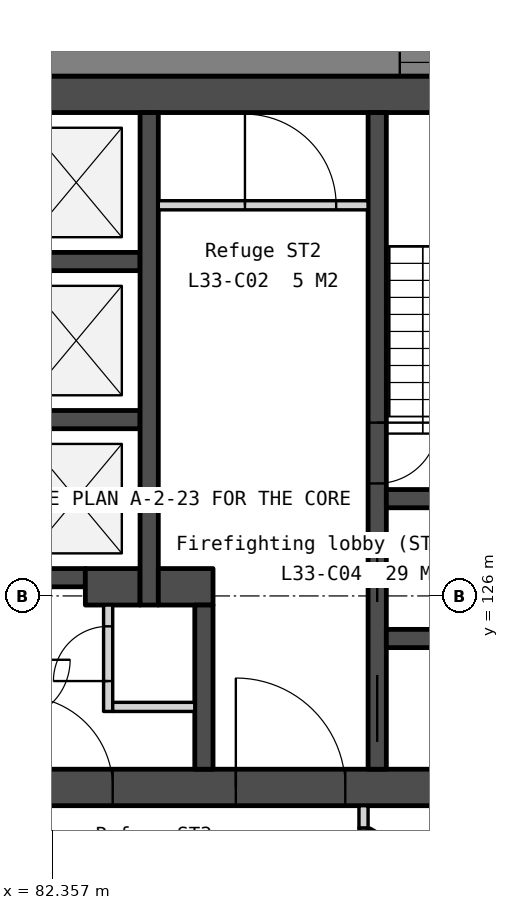
"""IFC4 building model, lengths in metres.
Left out: names, types, materials, properties, quantities, classifications, styles, units other than length and angle.
Written with IfcOpenShell. Run it as: python <this file> out.ifc"""

import sys

from ifc_helpers import new_model, si_unit, direction, frame, frame_2d, origin, place, context, subcontext, project, spatial, polyline, rectangle, outline, extrude, element, fill, save


model = new_model("IFC4")
c1 = context("Model", 3, precision=1e-05, world=origin(), true_north=direction((0.0, 1.0)))
c2 = subcontext(c1, "Body", "Model", "MODEL_VIEW")
j1 = project(units=[si_unit("LENGTHUNIT", "METRE"), si_unit("PLANEANGLEUNIT", "RADIAN")], contexts=[c1])
p1 = place(None, origin())
s1 = spatial("IfcSite", under=j1, at=p1, CompositionType="ELEMENT")
p2 = place(p1, origin())
s2 = spatial("IfcBuilding", under=s1, at=p2, CompositionType="ELEMENT")
p3 = place(p2, frame((0.0, 0.0, 132.5)))
s3 = spatial("IfcBuildingStorey", under=s2, at=p3, CompositionType="ELEMENT", Elevation=132.5)
p4 = place(p3, frame((69.0, 134.25, 0.0), z_axis=(0.0, 0.0, 1.0), x_axis=(1.0, 0.0, 0.0)))
e1 = element("IfcWall", 1, at=p4, inside=s3, PredefinedType="SOLIDWALL", context=c2, shape_type="SweptSolid", body=[
    extrude(rectangle(XDim=22.0, YDim=0.6, at=frame_2d((11.0, 0.0))), origin(), (0.0, 0.0, 1.0), 3.75),
])
p5 = place(p3, frame((69.0, 122.85, 0.0), z_axis=(0.0, 0.0, 1.0), x_axis=(1.0, 0.0, 0.0)))
e2 = element("IfcWall", 2, at=p5, inside=s3, PredefinedType="SOLIDWALL", context=c2, shape_type="SweptSolid", body=[
    extrude(rectangle(XDim=22.0, YDim=0.6, at=frame_2d((11.0, 0.0))), origin(), (0.0, 0.0, 1.0), 3.75),
])
p6 = place(p5, frame((16.375, 0.0, 0.0)))
e3 = element("IfcOpeningElement", 3, at=p6, cuts=e2, PredefinedType="OPENING", context=c2, shape_type="SweptSolid", body=[
    extrude(rectangle(XDim=1.8, YDim=2.1, at=frame_2d((0.9, 1.05))), frame((0.0, 0.31, 0.0), z_axis=(0.0, -1.0, 0.0), x_axis=(1.0, 0.0, 0.0)), (0.0, 0.0, 1.0), 0.62),
])
p7 = place(p5, frame((3.825, 0.0, 0.0)))
e4 = element("IfcOpeningElement", 4, at=p7, cuts=e2, PredefinedType="OPENING", context=c2, shape_type="SweptSolid", body=[
    extrude(rectangle(XDim=1.8, YDim=2.1, at=frame_2d((0.9, 1.05))), frame((0.0, 0.31, 0.0), z_axis=(0.0, -1.0, 0.0), x_axis=(1.0, 0.0, 0.0)), (0.0, 0.0, 1.0), 0.62),
])
p8 = place(p5, frame((12.85, 0.0, 0.0)))
e5 = element("IfcOpeningElement", 5, at=p8, cuts=e2, PredefinedType="OPENING", context=c2, shape_type="SweptSolid", body=[
    extrude(rectangle(XDim=1.5, YDim=2.1, at=frame_2d((0.75, 1.05))), frame((0.0, 0.31, 0.0), z_axis=(0.0, -1.0, 0.0), x_axis=(1.0, 0.0, 0.0)), (0.0, 0.0, 1.0), 0.62),
])
for number, where, z_axis, x_axis in (
    (6, (81.7, 131.5, 0.0), (0.0, 0.0, 1.0), (1.0, 0.0, 0.0)),
    (7, (81.7, 128.9, 0.0), (0.0, 0.0, 1.0), (1.0, 0.0, 0.0)),
):
    element("IfcWall", number, at=place(p3, frame(where, z_axis=z_axis, x_axis=x_axis)), inside=s3, PredefinedType="SOLIDWALL", context=c2, shape_type="SweptSolid", body=[
        extrude(rectangle(XDim=2.1, YDim=0.3, at=frame_2d((1.05, 0.0))), origin(), (0.0, 0.0, 1.0), 3.75),
    ])
p9 = place(p3, frame((81.7, 126.3, 0.0), z_axis=(0.0, 0.0, 1.0), x_axis=(1.0, 0.0, 0.0)))
e8 = element("IfcWall", 8, at=p9, inside=s3, PredefinedType="SOLIDWALL", context=c2, shape_type="SweptSolid", body=[
    extrude(rectangle(XDim=1.2, YDim=0.3, at=frame_2d((0.6, 0.0))), origin(), (0.0, 0.0, 1.0), 3.75),
])
p10 = place(p3, frame((82.9, 126.15, 0.0), z_axis=(0.0, 0.0, 1.0), x_axis=(1.0, 0.0, 0.0)))
e9 = element("IfcWall", 9, at=p10, inside=s3, PredefinedType="SOLIDWALL", context=c2, shape_type="SweptSolid", body=[
    extrude(rectangle(XDim=0.9, YDim=0.6, at=frame_2d((0.45, 0.0))), origin(), (0.0, 0.0, 1.0), 3.75),
])
p11 = place(p3, frame((83.275, 125.85, 0.0), z_axis=(0.0, 0.0, 1.0), x_axis=(0.0, -1.0, 0.0)))
e10 = element("IfcWall", 10, at=p11, inside=s3, PredefinedType="PARTITIONING", context=c2, shape_type="SweptSolid", body=[
    extrude(rectangle(XDim=1.75, YDim=0.15, at=frame_2d((0.875, 0.0))), origin(), (0.0, 0.0, 1.0), 3.75),
])
p12 = place(p11, frame((0.35, 0.0, 0.0)))
e11 = element("IfcOpeningElement", 11, at=p12, cuts=e10, PredefinedType="OPENING", context=c2, shape_type="SweptSolid", body=[
    extrude(rectangle(XDim=0.9, YDim=2.1, at=frame_2d((0.45, 1.05))), frame((0.0, 0.085, 0.0), z_axis=(0.0, -1.0, 0.0), x_axis=(1.0, 0.0, 0.0)), (0.0, 0.0, 1.0), 0.17),
])
p13 = place(p3, frame((83.35, 124.175, 0.0), z_axis=(0.0, 0.0, 1.0), x_axis=(1.0, 0.0, 0.0)))
e12 = element("IfcWall", 12, at=p13, inside=s3, PredefinedType="PARTITIONING", context=c2, shape_type="SweptSolid", body=[
    extrude(rectangle(XDim=1.35, YDim=0.15, at=frame_2d((0.675, 0.0))), origin(), (0.0, 0.0, 1.0), 3.75),
])
p14 = place(p3, frame((83.95, 133.95, 0.0), z_axis=(0.0, 0.0, 1.0), x_axis=(0.0, -1.0, 0.0)))
e13 = element("IfcWall", 13, at=p14, inside=s3, PredefinedType="SOLIDWALL", context=c2, shape_type="SweptSolid", body=[
    extrude(rectangle(XDim=8.1, YDim=0.3, at=frame_2d((4.05, 0.0))), origin(), (0.0, 0.0, 1.0), 3.75),
])
p15 = place(p3, frame((84.1, 132.425, 0.0), z_axis=(0.0, 0.0, 1.0), x_axis=(1.0, 0.0, 0.0)))
e14 = element("IfcWall", 14, at=p15, inside=s3, PredefinedType="PARTITIONING", context=c2, shape_type="SweptSolid", body=[
    extrude(rectangle(XDim=3.45, YDim=0.15, at=frame_2d((1.725, 0.0))), origin(), (0.0, 0.0, 1.0), 3.75),
])
p16 = place(p15, frame((1.425, 0.0, 0.0)))
e15 = element("IfcOpeningElement", 15, at=p16, cuts=e14, PredefinedType="OPENING", context=c2, shape_type="SweptSolid", body=[
    extrude(rectangle(XDim=1.5, YDim=2.1, at=frame_2d((0.75, 1.05))), frame((0.0, 0.085, 0.0), z_axis=(0.0, -1.0, 0.0), x_axis=(1.0, 0.0, 0.0)), (0.0, 0.0, 1.0), 0.17),
])
p17 = place(p3, frame((84.1, 126.15, 0.0), z_axis=(0.0, 0.0, 1.0), x_axis=(1.0, 0.0, 0.0)))
e16 = element("IfcWall", 16, at=p17, inside=s3, PredefinedType="SOLIDWALL", context=c2, shape_type="SweptSolid", body=[
    extrude(rectangle(XDim=0.9, YDim=0.6, at=frame_2d((0.45, 0.0))), origin(), (0.0, 0.0, 1.0), 3.75),
])
p18 = place(p3, frame((84.85, 125.85, 0.0), z_axis=(0.0, 0.0, 1.0), x_axis=(0.0, -1.0, 0.0)))
e17 = element("IfcWall", 17, at=p18, inside=s3, PredefinedType="SOLIDWALL", context=c2, shape_type="SweptSolid", body=[
    extrude(rectangle(XDim=2.7, YDim=0.3, at=frame_2d((1.35, 0.0))), origin(), (0.0, 0.0, 1.0), 3.75),
])
p19 = place(p3, frame((87.7, 133.95, 0.0), z_axis=(0.0, 0.0, 1.0), x_axis=(0.0, -1.0, 0.0)))
e18 = element("IfcWall", 18, at=p19, inside=s3, PredefinedType="SOLIDWALL", context=c2, shape_type="SweptSolid", body=[
    extrude(rectangle(XDim=10.8, YDim=0.3, at=frame_2d((5.4, 0.0))), origin(), (0.0, 0.0, 1.0), 3.75),
])
p20 = place(p19, frame((6.95, 0.0, 0.0)))
e19 = element("IfcOpeningElement", 19, at=p20, cuts=e18, PredefinedType="OPENING", context=c2, shape_type="SweptSolid", body=[
    extrude(rectangle(XDim=1.1, YDim=2.1, at=frame_2d((0.55, 1.05))), frame((0.0, 0.16, 0.0), z_axis=(0.0, -1.0, 0.0), x_axis=(1.0, 0.0, 0.0)), (0.0, 0.0, 1.0), 0.32),
])
p21 = place(p19, frame((5.1, 0.0, 0.0)))
e20 = element("IfcOpeningElement", 20, at=p21, cuts=e18, PredefinedType="OPENING", context=c2, shape_type="SweptSolid", body=[
    extrude(rectangle(XDim=1.0, YDim=2.1, at=frame_2d((0.5, 1.05))), frame((0.0, 0.16, 0.0), z_axis=(0.0, -1.0, 0.0), x_axis=(1.0, 0.0, 0.0)), (0.0, 0.0, 1.0), 0.32),
])
p22 = place(p19, frame((9.25, 0.0, 0.0)))
e21 = element("IfcOpeningElement", 21, at=p22, cuts=e18, PredefinedType="OPENING", context=c2, shape_type="SweptSolid", body=[
    extrude(rectangle(XDim=1.1, YDim=2.1, at=frame_2d((0.55, 1.05))), frame((0.0, 0.16, 0.0), z_axis=(0.0, -1.0, 0.0), x_axis=(1.0, 0.0, 0.0)), (0.0, 0.0, 1.0), 0.32),
])
for number, where, z_axis, x_axis in (
    (22, (87.85, 127.6, 0.0), (0.0, 0.0, 1.0), (1.0, 0.0, 0.0)),
    (23, (87.85, 125.3, 0.0), (0.0, 0.0, 1.0), (1.0, 0.0, 0.0)),
):
    element("IfcWall", number, at=place(p3, frame(where, z_axis=z_axis, x_axis=x_axis)), inside=s3, PredefinedType="SOLIDWALL", context=c2, shape_type="SweptSolid", body=[
        extrude(rectangle(XDim=2.55, YDim=0.3, at=frame_2d((1.275, 0.0))), origin(), (0.0, 0.0, 1.0), 3.75),
    ])
p23 = place(p3, frame((100.243, 134.775, -0.15), z_axis=(0.0, 0.0, 1.0), x_axis=(-1.0, 0.0, 0.0)))
e24 = element("IfcWall", 24, at=p23, inside=s3, PredefinedType="SOLIDWALL", context=c2, shape_type="SweptSolid", body=[
    extrude(outline(polyline([(40.486, 0.0), (40.486, 3.9), (0.0, 3.9), (0.0, 0.0), (40.486, 0.0)])), frame((0.0, 0.225, 0.0), z_axis=(0.0, -1.0, 0.0), x_axis=(1.0, 0.0, 0.0)), (0.0, 0.0, 1.0), 0.45),
])
p24 = place(p23, frame((0.837, 0.0, 0.95)))
e25 = element("IfcOpeningElement", 25, at=p24, cuts=e24, PredefinedType="OPENING", context=c2, shape_type="SweptSolid", body=[
    extrude(rectangle(XDim=1.2, YDim=2.2, at=frame_2d((0.6, 1.1))), frame((0.0, 0.235, 0.0), z_axis=(0.0, -1.0, 0.0), x_axis=(1.0, 0.0, 0.0)), (0.0, 0.0, 1.0), 0.47),
])
p25 = place(p23, frame((8.072, 0.0, 0.95)))
e26 = element("IfcOpeningElement", 26, at=p25, cuts=e24, PredefinedType="OPENING", context=c2, shape_type="SweptSolid", body=[
    extrude(rectangle(XDim=1.8, YDim=2.2, at=frame_2d((0.9, 1.1))), frame((0.0, 0.235, 0.0), z_axis=(0.0, -1.0, 0.0), x_axis=(1.0, 0.0, 0.0)), (0.0, 0.0, 1.0), 0.47),
])
p26 = place(p23, frame((10.372, 0.0, 0.95)))
e27 = element("IfcOpeningElement", 27, at=p26, cuts=e24, PredefinedType="OPENING", context=c2, shape_type="SweptSolid", body=[
    extrude(rectangle(XDim=1.8, YDim=2.2, at=frame_2d((0.9, 1.1))), frame((0.0, 0.235, 0.0), z_axis=(0.0, -1.0, 0.0), x_axis=(1.0, 0.0, 0.0)), (0.0, 0.0, 1.0), 0.47),
])
p27 = place(p23, frame((18.193, 0.0, 0.95)))
e28 = element("IfcOpeningElement", 28, at=p27, cuts=e24, PredefinedType="OPENING", context=c2, shape_type="SweptSolid", body=[
    extrude(rectangle(XDim=1.8, YDim=2.2, at=frame_2d((0.9, 1.1))), frame((0.0, 0.235, 0.0), z_axis=(0.0, -1.0, 0.0), x_axis=(1.0, 0.0, 0.0)), (0.0, 0.0, 1.0), 0.47),
])
p28 = place(p23, frame((20.493, 0.0, 0.95)))
e29 = element("IfcOpeningElement", 29, at=p28, cuts=e24, PredefinedType="OPENING", context=c2, shape_type="SweptSolid", body=[
    extrude(rectangle(XDim=1.8, YDim=2.2, at=frame_2d((0.9, 1.1))), frame((0.0, 0.235, 0.0), z_axis=(0.0, -1.0, 0.0), x_axis=(1.0, 0.0, 0.0)), (0.0, 0.0, 1.0), 0.47),
])
p29 = place(p23, frame((28.315, 0.0, 0.95)))
e30 = element("IfcOpeningElement", 30, at=p29, cuts=e24, PredefinedType="OPENING", context=c2, shape_type="SweptSolid", body=[
    extrude(rectangle(XDim=1.8, YDim=2.2, at=frame_2d((0.9, 1.1))), frame((0.0, 0.235, 0.0), z_axis=(0.0, -1.0, 0.0), x_axis=(1.0, 0.0, 0.0)), (0.0, 0.0, 1.0), 0.47),
])
p30 = place(p23, frame((30.615, 0.0, 0.95)))
e31 = element("IfcOpeningElement", 31, at=p30, cuts=e24, PredefinedType="OPENING", context=c2, shape_type="SweptSolid", body=[
    extrude(rectangle(XDim=1.8, YDim=2.2, at=frame_2d((0.9, 1.1))), frame((0.0, 0.235, 0.0), z_axis=(0.0, -1.0, 0.0), x_axis=(1.0, 0.0, 0.0)), (0.0, 0.0, 1.0), 0.47),
])
p31 = place(p23, frame((38.449, 0.0, 0.95)))
e32 = element("IfcOpeningElement", 32, at=p31, cuts=e24, PredefinedType="OPENING", context=c2, shape_type="SweptSolid", body=[
    extrude(rectangle(XDim=1.2, YDim=2.2, at=frame_2d((0.6, 1.1))), frame((0.0, 0.235, 0.0), z_axis=(0.0, -1.0, 0.0), x_axis=(1.0, 0.0, 0.0)), (0.0, 0.0, 1.0), 0.47),
])
p32 = place(p3, frame((82.105, 96.067, -0.15), z_axis=(0.0, 0.0, 1.0), x_axis=(0.499997369791, 0.866026922331, 0.0)))
e33 = element("IfcWall", 33, at=p32, inside=s3, PredefinedType="SOLIDWALL", context=c2, shape_type="SweptSolid", body=[
    extrude(outline(polyline([(40.486, 0.0), (40.486, 3.9), (0.0, 3.9), (0.0, 0.0), (40.486, 0.0)])), frame((0.0, 0.225, 0.0), z_axis=(0.0, -1.0, 0.0), x_axis=(1.0, 0.0, 0.0)), (0.0, 0.0, 1.0), 0.45),
])
p33 = place(p32, frame((0.837, 0.0, 0.95)))
e34 = element("IfcOpeningElement", 34, at=p33, cuts=e33, PredefinedType="OPENING", context=c2, shape_type="SweptSolid", body=[
    extrude(rectangle(XDim=1.2, YDim=2.2, at=frame_2d((0.6, 1.1))), frame((0.0, 0.235, 0.0), z_axis=(0.0, -1.0, 0.0), x_axis=(1.0, 0.0, 0.0)), (0.0, 0.0, 1.0), 0.47),
])
p34 = place(p32, frame((8.072, 0.0, 0.95)))
e35 = element("IfcOpeningElement", 35, at=p34, cuts=e33, PredefinedType="OPENING", context=c2, shape_type="SweptSolid", body=[
    extrude(rectangle(XDim=1.8, YDim=2.2, at=frame_2d((0.9, 1.1))), frame((0.0, 0.235, 0.0), z_axis=(0.0, -1.0, 0.0), x_axis=(1.0, 0.0, 0.0)), (0.0, 0.0, 1.0), 0.47),
])
p35 = place(p32, frame((10.372, 0.0, 0.95)))
e36 = element("IfcOpeningElement", 36, at=p35, cuts=e33, PredefinedType="OPENING", context=c2, shape_type="SweptSolid", body=[
    extrude(rectangle(XDim=1.8, YDim=2.2, at=frame_2d((0.9, 1.1))), frame((0.0, 0.235, 0.0), z_axis=(0.0, -1.0, 0.0), x_axis=(1.0, 0.0, 0.0)), (0.0, 0.0, 1.0), 0.47),
])
p36 = place(p32, frame((18.193, 0.0, 0.95)))
e37 = element("IfcOpeningElement", 37, at=p36, cuts=e33, PredefinedType="OPENING", context=c2, shape_type="SweptSolid", body=[
    extrude(rectangle(XDim=1.8, YDim=2.2, at=frame_2d((0.9, 1.1))), frame((0.0, 0.235, 0.0), z_axis=(0.0, -1.0, 0.0), x_axis=(1.0, 0.0, 0.0)), (0.0, 0.0, 1.0), 0.47),
])
p37 = place(p32, frame((20.493, 0.0, 0.95)))
e38 = element("IfcOpeningElement", 38, at=p37, cuts=e33, PredefinedType="OPENING", context=c2, shape_type="SweptSolid", body=[
    extrude(rectangle(XDim=1.8, YDim=2.2, at=frame_2d((0.9, 1.1))), frame((0.0, 0.235, 0.0), z_axis=(0.0, -1.0, 0.0), x_axis=(1.0, 0.0, 0.0)), (0.0, 0.0, 1.0), 0.47),
])
p38 = place(p32, frame((28.315, 0.0, 0.95)))
e39 = element("IfcOpeningElement", 39, at=p38, cuts=e33, PredefinedType="OPENING", context=c2, shape_type="SweptSolid", body=[
    extrude(rectangle(XDim=1.8, YDim=2.2, at=frame_2d((0.9, 1.1))), frame((0.0, 0.235, 0.0), z_axis=(0.0, -1.0, 0.0), x_axis=(1.0, 0.0, 0.0)), (0.0, 0.0, 1.0), 0.47),
])
p39 = place(p32, frame((30.615, 0.0, 0.95)))
e40 = element("IfcOpeningElement", 40, at=p39, cuts=e33, PredefinedType="OPENING", context=c2, shape_type="SweptSolid", body=[
    extrude(rectangle(XDim=1.8, YDim=2.2, at=frame_2d((0.9, 1.1))), frame((0.0, 0.235, 0.0), z_axis=(0.0, -1.0, 0.0), x_axis=(1.0, 0.0, 0.0)), (0.0, 0.0, 1.0), 0.47),
])
p40 = place(p32, frame((38.449, 0.0, 0.95)))
e41 = element("IfcOpeningElement", 41, at=p40, cuts=e33, PredefinedType="OPENING", context=c2, shape_type="SweptSolid", body=[
    extrude(rectangle(XDim=1.2, YDim=2.2, at=frame_2d((0.6, 1.1))), frame((0.0, 0.235, 0.0), z_axis=(0.0, -1.0, 0.0), x_axis=(1.0, 0.0, 0.0)), (0.0, 0.0, 1.0), 0.47),
])
p41 = place(p3, frame((87.557, 122.137, 0.0), z_axis=(0.0, 0.0, 1.0), x_axis=(0.866029768103, -0.499992440702, 0.0)))
e42 = element("IfcWall", 42, at=p41, inside=s3, PredefinedType="PARTITIONING", context=c2, shape_type="SweptSolid", body=[
    extrude(rectangle(XDim=8.089, YDim=0.1, at=frame_2d((4.044, 0.0))), origin(), (0.0, 0.0, 1.0), 3.75),
])
p42 = place(p41, frame((3.594, 0.0, 0.0)))
e43 = element("IfcOpeningElement", 43, at=p42, cuts=e42, PredefinedType="OPENING", context=c2, shape_type="SweptSolid", body=[
    extrude(rectangle(XDim=0.9, YDim=2.1, at=frame_2d((0.45, 1.05))), frame((0.0, 0.06, 0.0), z_axis=(0.0, -1.0, 0.0), x_axis=(1.0, 0.0, 0.0)), (0.0, 0.0, 1.0), 0.12),
])
p43 = place(p3, frame((87.475, 120.025, 0.0), z_axis=(0.0, 0.0, 1.0), x_axis=(0.0, 1.0, 0.0)))
e44 = element("IfcWall", 44, at=p43, inside=s3, PredefinedType="PARTITIONING", context=c2, shape_type="SweptSolid", body=[
    extrude(rectangle(XDim=2.16, YDim=0.15, at=frame_2d((1.08, 0.0))), origin(), (0.0, 0.0, 1.0), 3.75),
])
p44 = place(p43, frame((0.58, 0.0, 0.0)))
e45 = element("IfcOpeningElement", 45, at=p44, cuts=e44, PredefinedType="OPENING", context=c2, shape_type="SweptSolid", body=[
    extrude(rectangle(XDim=1.0, YDim=2.1, at=frame_2d((0.5, 1.05))), frame((0.0, 0.085, 0.0), z_axis=(0.0, -1.0, 0.0), x_axis=(1.0, 0.0, 0.0)), (0.0, 0.0, 1.0), 0.17),
])
p45 = place(p3, frame((87.475, 122.185, 0.0), z_axis=(0.0, 0.0, 1.0), x_axis=(0.0, 1.0, 0.0)))
e46 = element("IfcWall", 46, at=p45, inside=s3, PredefinedType="PARTITIONING", context=c2, shape_type="SweptSolid", body=[
    extrude(rectangle(XDim=0.365, YDim=0.15, at=frame_2d((0.183, 0.0))), origin(), (0.0, 0.0, 1.0), 3.75),
])
p46 = place(p20, origin())
e47 = element("IfcDoor", 47, at=p46, inside=s3, OperationType="SLIDING_TO_LEFT", PredefinedType="DOOR", context=c2, shape_type="SweptSolid", body=[
    extrude(rectangle(XDim=1.1, YDim=2.1, at=frame_2d((0.55, 1.05))), frame((0.0, 0.025, 0.0), z_axis=(0.0, -1.0, 0.0), x_axis=(1.0, 0.0, 0.0)), (0.0, 0.0, 1.0), 0.05),
])
fill(e19, e47)
p47 = place(p6, origin())
e48 = element("IfcDoor", 48, at=p47, inside=s3, OperationType="DOUBLE_DOOR_DOUBLE_SWING", PredefinedType="DOOR", context=c2, shape_type="SweptSolid", body=[
    extrude(rectangle(XDim=1.8, YDim=2.1, at=frame_2d((0.9, 1.05))), frame((0.0, 0.025, 0.0), z_axis=(0.0, -1.0, 0.0), x_axis=(1.0, 0.0, 0.0)), (0.0, 0.0, 1.0), 0.05),
])
fill(e3, e48)
p48 = place(p8, origin())
e49 = element("IfcDoor", 49, at=p48, inside=s3, OperationType="DOUBLE_DOOR_DOUBLE_SWING", PredefinedType="DOOR", context=c2, shape_type="SweptSolid", body=[
    extrude(rectangle(XDim=1.5, YDim=2.1, at=frame_2d((0.75, 1.05))), frame((0.0, 0.025, 0.0), z_axis=(0.0, -1.0, 0.0), x_axis=(1.0, 0.0, 0.0)), (0.0, 0.0, 1.0), 0.05),
])
fill(e5, e49)
p49 = place(p12, origin())
e50 = element("IfcDoor", 50, at=p49, inside=s3, OperationType="SINGLE_SWING_RIGHT", PredefinedType="DOOR", context=c2, shape_type="SweptSolid", body=[
    extrude(rectangle(XDim=0.9, YDim=2.1, at=frame_2d((0.45, 1.05))), frame((0.0, 0.025, 0.0), z_axis=(0.0, -1.0, 0.0), x_axis=(1.0, 0.0, 0.0)), (0.0, 0.0, 1.0), 0.05),
])
fill(e11, e50)
p50 = place(p16, origin())
e51 = element("IfcDoor", 51, at=p50, inside=s3, OperationType="DOUBLE_DOOR_DOUBLE_SWING", PredefinedType="DOOR", context=c2, shape_type="SweptSolid", body=[
    extrude(rectangle(XDim=1.5, YDim=2.1, at=frame_2d((0.75, 1.05))), frame((0.0, 0.025, 0.0), z_axis=(0.0, -1.0, 0.0), x_axis=(1.0, 0.0, 0.0)), (0.0, 0.0, 1.0), 0.05),
])
fill(e15, e51)
p51 = place(p21, origin())
e52 = element("IfcDoor", 52, at=p51, inside=s3, OperationType="SINGLE_SWING_LEFT", PredefinedType="DOOR", context=c2, shape_type="SweptSolid", body=[
    extrude(rectangle(XDim=1.0, YDim=2.1, at=frame_2d((0.5, 1.05))), frame((0.0, 0.025, 0.0), z_axis=(0.0, -1.0, 0.0), x_axis=(1.0, 0.0, 0.0)), (0.0, 0.0, 1.0), 0.05),
])
fill(e20, e52)
p52 = place(p22, origin())
e53 = element("IfcDoor", 53, at=p52, inside=s3, OperationType="SLIDING_TO_LEFT", PredefinedType="DOOR", context=c2, shape_type="SweptSolid", body=[
    extrude(rectangle(XDim=1.1, YDim=2.1, at=frame_2d((0.55, 1.05))), frame((0.0, 0.025, 0.0), z_axis=(0.0, -1.0, 0.0), x_axis=(1.0, 0.0, 0.0)), (0.0, 0.0, 1.0), 0.05),
])
fill(e21, e53)
p53 = place(p26, origin())
e54 = element("IfcWindow", 54, at=p53, inside=s3, PartitioningType="SINGLE_PANEL", PredefinedType="WINDOW", context=c2, shape_type="SweptSolid", body=[
    extrude(rectangle(XDim=1.8, YDim=2.2, at=frame_2d((0.9, 1.1))), frame((0.0, 0.03, 0.0), z_axis=(0.0, -1.0, 0.0), x_axis=(1.0, 0.0, 0.0)), (0.0, 0.0, 1.0), 0.06),
])
fill(e27, e54)
save(model, sys.argv[1])
